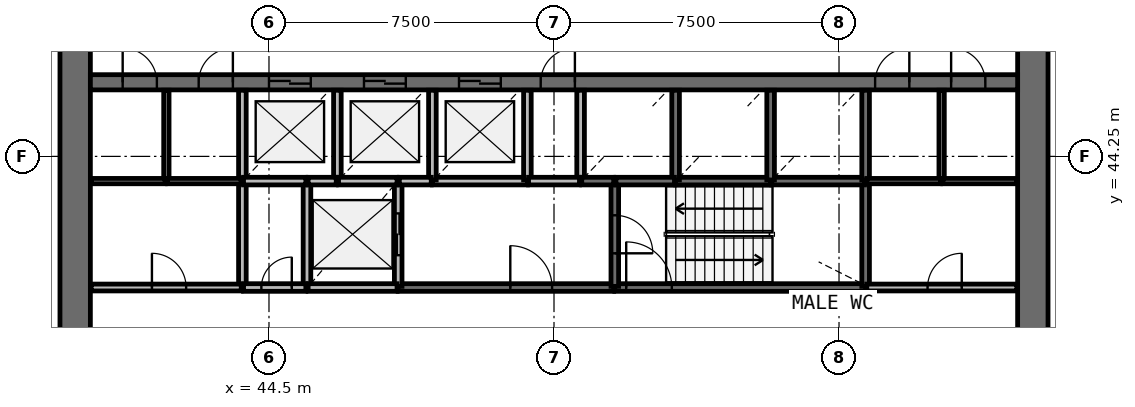
"""IFC4 building model, lengths in metres.
Left out: names, types, materials, properties, quantities, classifications, styles, units other than length and angle.
Written with IfcOpenShell. Run it as: python <this file> out.ifc"""

import sys

from ifc_helpers import new_model, si_unit, direction, frame, frame_2d, origin, place, context, subcontext, project, spatial, rectangle, extrude, source, transform, mapped, element, fill, save


model = new_model("IFC4")
c1 = context("Model", 3, precision=1e-05, world=origin(), true_north=direction((0.0, 1.0)))
c2 = subcontext(c1, "Body", "Model", "MODEL_VIEW")
j1 = project(units=[si_unit("LENGTHUNIT", "METRE"), si_unit("PLANEANGLEUNIT", "RADIAN")], contexts=[c1])
p1 = place(None, origin())
s1 = spatial("IfcSite", under=j1, at=p1, CompositionType="ELEMENT")
p2 = place(p1, origin())
s2 = spatial("IfcBuilding", under=s1, at=p2, CompositionType="ELEMENT")
p3 = place(p2, frame((0.0, 0.0, 96.2)))
s3 = spatial("IfcBuildingStorey", under=s2, at=p3, CompositionType="ELEMENT", Elevation=96.2)
p4 = place(p3, frame((64.6, 38.0, 0.0), z_axis=(0.0, 0.0, 1.0), x_axis=(0.0, 1.0, 0.0)))
e1 = element("IfcWall", 1, at=p4, inside=s3, PredefinedType="SHEAR", context=c2, shape_type="SweptSolid", body=[
    extrude(rectangle(XDim=20.0, YDim=0.8, at=frame_2d((10.0, 0.0))), origin(), (0.0, 0.0, 1.0), 4.1),
])
p5 = place(p4, frame((9.1, 0.0, 0.0)))
e2 = element("IfcOpeningElement", 2, at=p5, cuts=e1, PredefinedType="OPENING", context=c2, shape_type="SweptSolid", body=[
    extrude(rectangle(XDim=1.8, YDim=2.1, at=frame_2d((0.9, 1.05))), frame((0.0, 0.41, 0.0), z_axis=(0.0, -1.0, 0.0), x_axis=(1.0, 0.0, 0.0)), (0.0, 0.0, 1.0), 0.82),
])
p6 = place(p3, frame((39.4, 58.0, 0.0), z_axis=(0.0, 0.0, 1.0), x_axis=(0.0, -1.0, 0.0)))
e3 = element("IfcWall", 3, at=p6, inside=s3, PredefinedType="SHEAR", context=c2, shape_type="SweptSolid", body=[
    extrude(rectangle(XDim=20.0, YDim=0.8, at=frame_2d((10.0, 0.0))), origin(), (0.0, 0.0, 1.0), 4.1),
])
p7 = place(p6, frame((9.1, 0.0, 0.0)))
e4 = element("IfcOpeningElement", 4, at=p7, cuts=e3, PredefinedType="OPENING", context=c2, shape_type="SweptSolid", body=[
    extrude(rectangle(XDim=1.8, YDim=2.1, at=frame_2d((0.9, 1.05))), frame((0.0, 0.41, 0.0), z_axis=(0.0, -1.0, 0.0), x_axis=(1.0, 0.0, 0.0)), (0.0, 0.0, 1.0), 0.82),
])
p8 = place(p3, frame((39.8, 46.2, 0.0), z_axis=(0.0, 0.0, 1.0), x_axis=(1.0, 0.0, 0.0)))
e5 = element("IfcWall", 5, at=p8, inside=s3, PredefinedType="SHEAR", context=c2, shape_type="SweptSolid", body=[
    extrude(rectangle(XDim=24.4, YDim=0.4, at=frame_2d((12.2, 0.0))), origin(), (0.0, 0.0, 1.0), 4.1),
])
p9 = place(p8, frame((4.7, 0.0, 0.0)))
e6 = element("IfcOpeningElement", 6, at=p9, cuts=e5, PredefinedType="OPENING", context=c2, shape_type="SweptSolid", body=[
    extrude(rectangle(XDim=1.1, YDim=2.1, at=frame_2d((0.55, 1.05))), frame((0.0, 0.21, 0.0), z_axis=(0.0, -1.0, 0.0), x_axis=(1.0, 0.0, 0.0)), (0.0, 0.0, 1.0), 0.42),
])
p10 = place(p8, frame((7.2, 0.0, 0.0)))
e7 = element("IfcOpeningElement", 7, at=p10, cuts=e5, PredefinedType="OPENING", context=c2, shape_type="SweptSolid", body=[
    extrude(rectangle(XDim=1.1, YDim=2.1, at=frame_2d((0.55, 1.05))), frame((0.0, 0.21, 0.0), z_axis=(0.0, -1.0, 0.0), x_axis=(1.0, 0.0, 0.0)), (0.0, 0.0, 1.0), 0.42),
])
p11 = place(p8, frame((9.7, 0.0, 0.0)))
e8 = element("IfcOpeningElement", 8, at=p11, cuts=e5, PredefinedType="OPENING", context=c2, shape_type="SweptSolid", body=[
    extrude(rectangle(XDim=1.1, YDim=2.1, at=frame_2d((0.55, 1.05))), frame((0.0, 0.21, 0.0), z_axis=(0.0, -1.0, 0.0), x_axis=(1.0, 0.0, 0.0)), (0.0, 0.0, 1.0), 0.42),
])
p12 = place(p8, frame((20.65, 0.0, 0.0)))
e9 = element("IfcOpeningElement", 9, at=p12, cuts=e5, PredefinedType="OPENING", context=c2, shape_type="SweptSolid", body=[
    extrude(rectangle(XDim=0.9, YDim=2.1, at=frame_2d((0.45, 1.05))), frame((0.0, 0.21, 0.0), z_axis=(0.0, -1.0, 0.0), x_axis=(1.0, 0.0, 0.0)), (0.0, 0.0, 1.0), 0.42),
])
p13 = place(p8, frame((22.65, 0.0, 0.0)))
e10 = element("IfcOpeningElement", 10, at=p13, cuts=e5, PredefinedType="OPENING", context=c2, shape_type="SweptSolid", body=[
    extrude(rectangle(XDim=0.9, YDim=2.1, at=frame_2d((0.45, 1.05))), frame((0.0, 0.21, 0.0), z_axis=(0.0, -1.0, 0.0), x_axis=(1.0, 0.0, 0.0)), (0.0, 0.0, 1.0), 0.42),
])
p14 = place(p8, frame((0.85, 0.0, 0.0)))
e11 = element("IfcOpeningElement", 11, at=p14, cuts=e5, PredefinedType="OPENING", context=c2, shape_type="SweptSolid", body=[
    extrude(rectangle(XDim=0.9, YDim=2.1, at=frame_2d((0.45, 1.05))), frame((0.0, 0.21, 0.0), z_axis=(0.0, -1.0, 0.0), x_axis=(1.0, 0.0, 0.0)), (0.0, 0.0, 1.0), 0.42),
])
p15 = place(p8, frame((2.85, 0.0, 0.0)))
e12 = element("IfcOpeningElement", 12, at=p15, cuts=e5, PredefinedType="OPENING", context=c2, shape_type="SweptSolid", body=[
    extrude(rectangle(XDim=0.9, YDim=2.1, at=frame_2d((0.45, 1.05))), frame((0.0, 0.21, 0.0), z_axis=(0.0, -1.0, 0.0), x_axis=(1.0, 0.0, 0.0)), (0.0, 0.0, 1.0), 0.42),
])
p16 = place(p8, frame((11.85, 0.0, 0.0)))
e13 = element("IfcOpeningElement", 13, at=p16, cuts=e5, PredefinedType="OPENING", context=c2, shape_type="SweptSolid", body=[
    extrude(rectangle(XDim=0.9, YDim=2.1, at=frame_2d((0.45, 1.05))), frame((0.0, 0.21, 0.0), z_axis=(0.0, -1.0, 0.0), x_axis=(1.0, 0.0, 0.0)), (0.0, 0.0, 1.0), 0.42),
])
p17 = place(p3, frame((53.6, 40.8, 0.0), z_axis=(0.0, 0.0, 1.0), x_axis=(1.0, 0.0, 0.0)))
e14 = element("IfcWall", 14, at=p17, inside=s3, PredefinedType="SOLIDWALL", context=c2, shape_type="SweptSolid", body=[
    extrude(rectangle(XDim=6.6, YDim=0.2, at=frame_2d((3.3, 0.0))), origin(), (0.0, 0.0, 1.0), 3.7),
])
p18 = place(p17, frame((0.3, 0.0, 0.0)))
e15 = element("IfcOpeningElement", 15, at=p18, cuts=e14, PredefinedType="OPENING", context=c2, shape_type="SweptSolid", body=[
    extrude(rectangle(XDim=1.2, YDim=2.1, at=frame_2d((0.6, 1.05))), frame((0.0, 0.11, 0.0), z_axis=(0.0, -1.0, 0.0), x_axis=(1.0, 0.0, 0.0)), (0.0, 0.0, 1.0), 0.22),
])
p19 = place(p3, frame((47.9, 40.8, 0.0), z_axis=(0.0, 0.0, 1.0), x_axis=(1.0, 0.0, 0.0)))
e16 = element("IfcWall", 16, at=p19, inside=s3, PredefinedType="SOLIDWALL", context=c2, shape_type="SweptSolid", body=[
    extrude(rectangle(XDim=5.67, YDim=0.2, at=frame_2d((2.835, 0.0))), origin(), (0.0, 0.0, 1.0), 3.7),
])
p20 = place(p19, frame((2.95, 0.0, 0.0)))
e17 = element("IfcOpeningElement", 17, at=p20, cuts=e16, PredefinedType="OPENING", context=c2, shape_type="SweptSolid", body=[
    extrude(rectangle(XDim=1.1, YDim=2.1, at=frame_2d((0.55, 1.05))), frame((0.0, 0.11, 0.0), z_axis=(0.0, -1.0, 0.0), x_axis=(1.0, 0.0, 0.0)), (0.0, 0.0, 1.0), 0.22),
])
for number, where, z_axis, x_axis in (
    (18, (43.8, 43.6, 0.0), (0.0, 0.0, 1.0), (0.0, -1.0, 0.0)),
    (19, (45.5, 43.6, 0.0), (0.0, 0.0, 1.0), (0.0, -1.0, 0.0)),
):
    element("IfcWall", number, at=place(p3, frame(where, z_axis=z_axis, x_axis=x_axis)), inside=s3, PredefinedType="SOLIDWALL", context=c2, shape_type="SweptSolid", body=[
        extrude(rectangle(XDim=2.8, YDim=0.2, at=frame_2d((1.4, 0.0))), origin(), (0.0, 0.0, 1.0), 3.7),
    ])
p21 = place(p3, frame((47.9, 40.83, 0.0), z_axis=(0.0, 0.0, 1.0), x_axis=(0.0, 1.0, 0.0)))
e20 = element("IfcWall", 20, at=p21, inside=s3, PredefinedType="SOLIDWALL", context=c2, shape_type="SweptSolid", body=[
    extrude(rectangle(XDim=2.77, YDim=0.2, at=frame_2d((1.385, 0.0))), origin(), (0.0, 0.0, 1.0), 3.7),
])
p22 = place(p21, frame((0.82, 0.0, 0.0)))
e21 = element("IfcOpeningElement", 21, at=p22, cuts=e20, PredefinedType="OPENING", context=c2, shape_type="SweptSolid", body=[
    extrude(rectangle(XDim=1.1, YDim=2.1, at=frame_2d((0.55, 1.05))), frame((0.0, 0.11, 0.0), z_axis=(0.0, -1.0, 0.0), x_axis=(1.0, 0.0, 0.0)), (0.0, 0.0, 1.0), 0.22),
])
p23 = place(p3, frame((60.2, 40.83, 0.0), z_axis=(0.0, 0.0, 1.0), x_axis=(0.0, 1.0, 0.0)))
e22 = element("IfcWall", 22, at=p23, inside=s3, PredefinedType="SOLIDWALL", context=c2, shape_type="SweptSolid", body=[
    extrude(rectangle(XDim=2.77, YDim=0.2, at=frame_2d((1.385, 0.0))), origin(), (0.0, 0.0, 1.0), 3.7),
])
p24 = place(p3, frame((53.6, 43.6, 0.0), z_axis=(0.0, 0.0, 1.0), x_axis=(0.0, -1.0, 0.0)))
e23 = element("IfcWall", 23, at=p24, inside=s3, PredefinedType="SOLIDWALL", context=c2, shape_type="SweptSolid", body=[
    extrude(rectangle(XDim=2.77, YDim=0.2, at=frame_2d((1.385, 0.0))), origin(), (0.0, 0.0, 1.0), 3.7),
])
p25 = place(p24, frame((0.9, 0.0, 0.0)))
e24 = element("IfcOpeningElement", 24, at=p25, cuts=e23, PredefinedType="OPENING", context=c2, shape_type="SweptSolid", body=[
    extrude(rectangle(XDim=1.0, YDim=2.1, at=frame_2d((0.5, 1.05))), frame((0.0, 0.11, 0.0), z_axis=(0.0, -1.0, 0.0), x_axis=(1.0, 0.0, 0.0)), (0.0, 0.0, 1.0), 0.22),
])
for number, where, z_axis, x_axis in (
    (25, (48.8, 43.6, 0.0), (0.0, 0.0, 1.0), (1.0, 0.0, 0.0)),
    (26, (55.2, 43.6, 0.0), (0.0, 0.0, 1.0), (1.0, 0.0, 0.0)),
):
    element("IfcWall", number, at=place(p3, frame(where, z_axis=z_axis, x_axis=x_axis)), inside=s3, PredefinedType="SOLIDWALL", context=c2, shape_type="SweptSolid", body=[
        extrude(rectangle(XDim=2.5, YDim=0.2, at=frame_2d((1.25, 0.0))), origin(), (0.0, 0.0, 1.0), 3.7),
    ])
p26 = place(p3, frame((57.73, 43.6, 0.0), z_axis=(0.0, 0.0, 1.0), x_axis=(1.0, 0.0, 0.0)))
e27 = element("IfcWall", 27, at=p26, inside=s3, PredefinedType="SOLIDWALL", context=c2, shape_type="SweptSolid", body=[
    extrude(rectangle(XDim=2.44, YDim=0.2, at=frame_2d((1.22, 0.0))), origin(), (0.0, 0.0, 1.0), 3.7),
])
p27 = place(p3, frame((45.53, 40.8, 0.0), z_axis=(0.0, 0.0, 1.0), x_axis=(1.0, 0.0, 0.0)))
e28 = element("IfcWall", 28, at=p27, inside=s3, PredefinedType="SOLIDWALL", context=c2, shape_type="SweptSolid", body=[
    extrude(rectangle(XDim=2.34, YDim=0.2, at=frame_2d((1.17, 0.0))), origin(), (0.0, 0.0, 1.0), 3.7),
])
p28 = place(p3, frame((43.8, 45.99, 0.0), z_axis=(0.0, 0.0, 1.0), x_axis=(0.0, -1.0, 0.0)))
e29 = element("IfcWall", 29, at=p28, inside=s3, PredefinedType="SOLIDWALL", context=c2, shape_type="SweptSolid", body=[
    extrude(rectangle(XDim=2.36, YDim=0.2, at=frame_2d((1.18, 0.0))), origin(), (0.0, 0.0, 1.0), 3.7),
])
p29 = place(p3, frame((46.3, 43.6, 0.0), z_axis=(0.0, 0.0, 1.0), x_axis=(0.0, 1.0, 0.0)))
e30 = element("IfcWall", 30, at=p29, inside=s3, PredefinedType="SOLIDWALL", context=c2, shape_type="SweptSolid", body=[
    extrude(rectangle(XDim=2.39, YDim=0.2, at=frame_2d((1.195, 0.0))), origin(), (0.0, 0.0, 1.0), 3.7),
])
for number, where, z_axis, x_axis in (
    (31, (48.8, 43.63, 0.0), (0.0, 0.0, 1.0), (0.0, 1.0, 0.0)),
    (32, (51.3, 43.63, 0.0), (0.0, 0.0, 1.0), (0.0, 1.0, 0.0)),
):
    element("IfcWall", number, at=place(p3, frame(where, z_axis=z_axis, x_axis=x_axis)), inside=s3, PredefinedType="SOLIDWALL", context=c2, shape_type="SweptSolid", body=[
        extrude(rectangle(XDim=2.36, YDim=0.2, at=frame_2d((1.18, 0.0))), origin(), (0.0, 0.0, 1.0), 3.7),
    ])
p30 = place(p3, frame((52.7, 45.99, 0.0), z_axis=(0.0, 0.0, 1.0), x_axis=(0.0, -1.0, 0.0)))
e33 = element("IfcWall", 33, at=p30, inside=s3, PredefinedType="SOLIDWALL", context=c2, shape_type="SweptSolid", body=[
    extrude(rectangle(XDim=2.39, YDim=0.2, at=frame_2d((1.195, 0.0))), origin(), (0.0, 0.0, 1.0), 3.7),
])
for number, where, z_axis, x_axis in (
    (34, (55.2, 43.63, 0.0), (0.0, 0.0, 1.0), (0.0, 1.0, 0.0)),
    (35, (57.7, 43.63, 0.0), (0.0, 0.0, 1.0), (0.0, 1.0, 0.0)),
    (36, (60.2, 43.63, 0.0), (0.0, 0.0, 1.0), (0.0, 1.0, 0.0)),
):
    element("IfcWall", number, at=place(p3, frame(where, z_axis=z_axis, x_axis=x_axis)), inside=s3, PredefinedType="SOLIDWALL", context=c2, shape_type="SweptSolid", body=[
        extrude(rectangle(XDim=2.36, YDim=0.2, at=frame_2d((1.18, 0.0))), origin(), (0.0, 0.0, 1.0), 3.7),
    ])
p31 = place(p3, frame((43.83, 43.6, 0.0), z_axis=(0.0, 0.0, 1.0), x_axis=(1.0, 0.0, 0.0)))
e37 = element("IfcWall", 37, at=p31, inside=s3, PredefinedType="SOLIDWALL", context=c2, shape_type="SweptSolid", body=[
    extrude(rectangle(XDim=1.64, YDim=0.2, at=frame_2d((0.82, 0.0))), origin(), (0.0, 0.0, 1.0), 3.7),
])
p32 = place(p3, frame((43.83, 40.8, 0.0), z_axis=(0.0, 0.0, 1.0), x_axis=(1.0, 0.0, 0.0)))
e38 = element("IfcWall", 38, at=p32, inside=s3, PredefinedType="SOLIDWALL", context=c2, shape_type="SweptSolid", body=[
    extrude(rectangle(XDim=1.64, YDim=0.2, at=frame_2d((0.82, 0.0))), origin(), (0.0, 0.0, 1.0), 3.7),
])
p33 = place(p32, frame((0.47, 0.0, 0.0)))
e39 = element("IfcOpeningElement", 39, at=p33, cuts=e38, PredefinedType="OPENING", context=c2, shape_type="SweptSolid", body=[
    extrude(rectangle(XDim=0.8, YDim=2.1, at=frame_2d((0.4, 1.05))), frame((0.0, 0.11, 0.0), z_axis=(0.0, -1.0, 0.0), x_axis=(1.0, 0.0, 0.0)), (0.0, 0.0, 1.0), 0.22),
])
for number, where, z_axis, x_axis in (
    (40, (46.33, 43.6, 0.0), (0.0, 0.0, 1.0), (1.0, 0.0, 0.0)),
    (41, (53.63, 43.6, 0.0), (0.0, 0.0, 1.0), (1.0, 0.0, 0.0)),
):
    element("IfcWall", number, at=place(p3, frame(where, z_axis=z_axis, x_axis=x_axis)), inside=s3, PredefinedType="SOLIDWALL", context=c2, shape_type="SweptSolid", body=[
        extrude(rectangle(XDim=1.54, YDim=0.2, at=frame_2d((0.77, 0.0))), origin(), (0.0, 0.0, 1.0), 3.7),
    ])
p34 = place(p3, frame((52.67, 43.6, 0.0), z_axis=(0.0, 0.0, 1.0), x_axis=(-1.0, 0.0, 0.0)))
e42 = element("IfcWall", 42, at=p34, inside=s3, PredefinedType="SOLIDWALL", context=c2, shape_type="SweptSolid", body=[
    extrude(rectangle(XDim=1.34, YDim=0.2, at=frame_2d((0.67, 0.0))), origin(), (0.0, 0.0, 1.0), 3.7),
])
for number, where, z_axis, x_axis in (
    (43, (47.93, 43.6, 0.0), (0.0, 0.0, 1.0), (1.0, 0.0, 0.0)),
    (44, (52.73, 43.6, 0.0), (0.0, 0.0, 1.0), (1.0, 0.0, 0.0)),
):
    element("IfcWall", number, at=place(p3, frame(where, z_axis=z_axis, x_axis=x_axis)), inside=s3, PredefinedType="SOLIDWALL", context=c2, shape_type="SweptSolid", body=[
        extrude(rectangle(XDim=0.84, YDim=0.2, at=frame_2d((0.42, 0.0))), origin(), (0.0, 0.0, 1.0), 3.7),
    ])
p35 = place(p3, frame((45.53, 43.6, 0.0), z_axis=(0.0, 0.0, 1.0), x_axis=(1.0, 0.0, 0.0)))
e45 = element("IfcWall", 45, at=p35, inside=s3, PredefinedType="SOLIDWALL", context=c2, shape_type="SweptSolid", body=[
    extrude(rectangle(XDim=0.74, YDim=0.2, at=frame_2d((0.37, 0.0))), origin(), (0.0, 0.0, 1.0), 3.7),
])
p36 = place(p3, frame((60.23, 40.8, 0.0), z_axis=(0.0, 0.0, 1.0), x_axis=(1.0, 0.0, 0.0)))
e46 = element("IfcWall", 46, at=p36, inside=s3, PredefinedType="PARTITIONING", context=c2, shape_type="SweptSolid", body=[
    extrude(rectangle(XDim=3.95, YDim=0.18, at=frame_2d((1.975, 0.0))), origin(), (0.0, 0.0, 1.0), 3.7),
])
p37 = place(p36, frame((1.6, 0.0, 0.0)))
e47 = element("IfcOpeningElement", 47, at=p37, cuts=e46, PredefinedType="OPENING", context=c2, shape_type="SweptSolid", body=[
    extrude(rectangle(XDim=0.9, YDim=2.1, at=frame_2d((0.45, 1.05))), frame((0.0, 0.1, 0.0), z_axis=(0.0, -1.0, 0.0), x_axis=(1.0, 0.0, 0.0)), (0.0, 0.0, 1.0), 0.2),
])
p38 = place(p3, frame((39.82, 40.8, 0.0), z_axis=(0.0, 0.0, 1.0), x_axis=(1.0, 0.0, 0.0)))
e48 = element("IfcWall", 48, at=p38, inside=s3, PredefinedType="PARTITIONING", context=c2, shape_type="SweptSolid", body=[
    extrude(rectangle(XDim=3.95, YDim=0.18, at=frame_2d((1.975, 0.0))), origin(), (0.0, 0.0, 1.0), 3.7),
])
p39 = place(p38, frame((1.6, 0.0, 0.0)))
e49 = element("IfcOpeningElement", 49, at=p39, cuts=e48, PredefinedType="OPENING", context=c2, shape_type="SweptSolid", body=[
    extrude(rectangle(XDim=0.9, YDim=2.1, at=frame_2d((0.45, 1.05))), frame((0.0, 0.1, 0.0), z_axis=(0.0, -1.0, 0.0), x_axis=(1.0, 0.0, 0.0)), (0.0, 0.0, 1.0), 0.2),
])
for number, where, z_axis, x_axis in (
    (50, (41.8, 43.6, 0.0), (0.0, 0.0, 1.0), (0.0, 1.0, 0.0)),
    (51, (62.2, 43.6, 0.0), (0.0, 0.0, 1.0), (0.0, 1.0, 0.0)),
):
    element("IfcWall", number, at=place(p3, frame(where, z_axis=z_axis, x_axis=x_axis)), inside=s3, PredefinedType="PARTITIONING", context=c2, shape_type="SweptSolid", body=[
        extrude(rectangle(XDim=2.39, YDim=0.14, at=frame_2d((1.195, 0.0))), origin(), (0.0, 0.0, 1.0), 2.9),
    ])
for number, where, z_axis, x_axis in (
    (52, (43.77, 43.6, 0.0), (0.0, 0.0, 1.0), (-1.0, 0.0, 0.0)),
    (53, (60.23, 43.6, 0.0), (0.0, 0.0, 1.0), (1.0, 0.0, 0.0)),
):
    element("IfcWall", number, at=place(p3, frame(where, z_axis=z_axis, x_axis=x_axis)), inside=s3, PredefinedType="PARTITIONING", context=c2, shape_type="SweptSolid", body=[
        extrude(rectangle(XDim=1.94, YDim=0.14, at=frame_2d((0.97, 0.0))), origin(), (0.0, 0.0, 1.0), 2.9),
    ])
for number, where, z_axis, x_axis in (
    (54, (62.23, 43.6, 0.0), (0.0, 0.0, 1.0), (1.0, 0.0, 0.0)),
    (55, (41.77, 43.6, 0.0), (0.0, 0.0, 1.0), (-1.0, 0.0, 0.0)),
):
    element("IfcWall", number, at=place(p3, frame(where, z_axis=z_axis, x_axis=x_axis)), inside=s3, PredefinedType="PARTITIONING", context=c2, shape_type="SweptSolid", body=[
        extrude(rectangle(XDim=1.95, YDim=0.14, at=frame_2d((0.975, 0.0))), origin(), (0.0, 0.0, 1.0), 2.9),
    ])
m1 = source(origin(), c2, "Body", "SweptSolid", [
    extrude(rectangle(XDim=1.1, YDim=2.1, at=frame_2d((0.55, 1.05))), frame((0.0, 0.025, 0.0), z_axis=(0.0, -1.0, 0.0), x_axis=(1.0, 0.0, 0.0)), (0.0, 0.0, 1.0), 0.05),
])
p40 = place(p9, origin())
e56 = element("IfcDoor", 56, at=p40, inside=s3, OperationType="DOUBLE_DOOR_SLIDING", PredefinedType="USERDEFINED", context=c2, shape_type="MappedRepresentation", body=[
    mapped(m1, transform((0.0, 0.0, 0.0), scale=1.0)),
])
fill(e6, e56)
p41 = place(p10, origin())
e57 = element("IfcDoor", 57, at=p41, inside=s3, OperationType="DOUBLE_DOOR_SLIDING", PredefinedType="USERDEFINED", context=c2, shape_type="MappedRepresentation", body=[
    mapped(m1, transform((0.0, 0.0, 0.0), scale=1.0)),
])
fill(e7, e57)
p42 = place(p11, origin())
e58 = element("IfcDoor", 58, at=p42, inside=s3, OperationType="DOUBLE_DOOR_SLIDING", PredefinedType="USERDEFINED", context=c2, shape_type="MappedRepresentation", body=[
    mapped(m1, transform((0.0, 0.0, 0.0), scale=1.0)),
])
fill(e8, e58)
p43 = place(p22, origin())
e59 = element("IfcDoor", 59, at=p43, inside=s3, OperationType="DOUBLE_DOOR_SLIDING", PredefinedType="USERDEFINED", context=c2, shape_type="MappedRepresentation", body=[
    mapped(m1, transform((0.0, 0.0, 0.0), scale=1.0)),
])
fill(e21, e59)
m2 = source(origin(), c2, "Body", "SweptSolid", [
    extrude(rectangle(XDim=1.2, YDim=2.1, at=frame_2d((0.6, 1.05))), frame((0.0, 0.025, 0.0), z_axis=(0.0, -1.0, 0.0), x_axis=(1.0, 0.0, 0.0)), (0.0, 0.0, 1.0), 0.05),
])
p44 = place(p18, origin())
e60 = element("IfcDoor", 60, at=p44, inside=s3, OperationType="SINGLE_SWING_LEFT", PredefinedType="DOOR", context=c2, shape_type="MappedRepresentation", body=[
    mapped(m2, transform((0.0, 0.0, 0.0), scale=1.0)),
])
fill(e15, e60)
m3 = source(origin(), c2, "Body", "SweptSolid", [
    extrude(rectangle(XDim=1.0, YDim=2.1, at=frame_2d((0.5, 1.05))), frame((0.0, 0.025, 0.0), z_axis=(0.0, -1.0, 0.0), x_axis=(1.0, 0.0, 0.0)), (0.0, 0.0, 1.0), 0.05),
])
p45 = place(p25, origin())
e61 = element("IfcDoor", 61, at=p45, inside=s3, OperationType="SINGLE_SWING_RIGHT", PredefinedType="DOOR", context=c2, shape_type="MappedRepresentation", body=[
    mapped(m3, transform((0.0, 0.0, 0.0), scale=1.0)),
])
fill(e24, e61)
m4 = source(origin(), c2, "Body", "SweptSolid", [
    extrude(rectangle(XDim=1.1, YDim=2.1, at=frame_2d((0.55, 1.05))), frame((0.0, 0.025, 0.0), z_axis=(0.0, -1.0, 0.0), x_axis=(1.0, 0.0, 0.0)), (0.0, 0.0, 1.0), 0.05),
])
p46 = place(p20, origin())
e62 = element("IfcDoor", 62, at=p46, inside=s3, OperationType="SINGLE_SWING_LEFT", PredefinedType="DOOR", context=c2, shape_type="MappedRepresentation", body=[
    mapped(m4, transform((0.0, 0.0, 0.0), scale=1.0)),
])
fill(e17, e62)
m5 = source(origin(), c2, "Body", "SweptSolid", [
    extrude(rectangle(XDim=0.8, YDim=2.1, at=frame_2d((0.4, 1.05))), frame((0.0, 0.025, 0.0), z_axis=(0.0, -1.0, 0.0), x_axis=(1.0, 0.0, 0.0)), (0.0, 0.0, 1.0), 0.05),
])
p47 = place(p33, origin())
e63 = element("IfcDoor", 63, at=p47, inside=s3, OperationType="SINGLE_SWING_RIGHT", PredefinedType="DOOR", context=c2, shape_type="MappedRepresentation", body=[
    mapped(m5, transform((0.0, 0.0, 0.0), scale=1.0)),
])
fill(e39, e63)
m6 = source(origin(), c2, "Body", "SweptSolid", [
    extrude(rectangle(XDim=0.9, YDim=2.1, at=frame_2d((0.45, 1.05))), frame((0.0, 0.025, 0.0), z_axis=(0.0, -1.0, 0.0), x_axis=(1.0, 0.0, 0.0)), (0.0, 0.0, 1.0), 0.05),
])
p48 = place(p39, origin())
e64 = element("IfcDoor", 64, at=p48, inside=s3, OperationType="SINGLE_SWING_LEFT", PredefinedType="DOOR", context=c2, shape_type="MappedRepresentation", body=[
    mapped(m6, transform((0.0, 0.0, 0.0), scale=1.0)),
])
fill(e49, e64)
p49 = place(p12, origin())
e65 = element("IfcDoor", 65, at=p49, inside=s3, OperationType="SINGLE_SWING_RIGHT", PredefinedType="DOOR", context=c2, shape_type="MappedRepresentation", body=[
    mapped(m6, transform((0.0, 0.0, 0.0), scale=1.0)),
])
fill(e9, e65)
p50 = place(p13, origin())
e66 = element("IfcDoor", 66, at=p50, inside=s3, OperationType="SINGLE_SWING_LEFT", PredefinedType="DOOR", context=c2, shape_type="MappedRepresentation", body=[
    mapped(m6, transform((0.0, 0.0, 0.0), scale=1.0)),
])
fill(e10, e66)
p51 = place(p37, origin())
e67 = element("IfcDoor", 67, at=p51, inside=s3, OperationType="SINGLE_SWING_RIGHT", PredefinedType="DOOR", context=c2, shape_type="MappedRepresentation", body=[
    mapped(m6, transform((0.0, 0.0, 0.0), scale=1.0)),
])
fill(e47, e67)
p52 = place(p14, origin())
e68 = element("IfcDoor", 68, at=p52, inside=s3, OperationType="SINGLE_SWING_LEFT", PredefinedType="DOOR", context=c2, shape_type="MappedRepresentation", body=[
    mapped(m6, transform((0.0, 0.0, 0.0), scale=1.0)),
])
fill(e11, e68)
p53 = place(p15, origin())
e69 = element("IfcDoor", 69, at=p53, inside=s3, OperationType="SINGLE_SWING_RIGHT", PredefinedType="DOOR", context=c2, shape_type="MappedRepresentation", body=[
    mapped(m6, transform((0.0, 0.0, 0.0), scale=1.0)),
])
fill(e12, e69)
p54 = place(p16, origin())
e70 = element("IfcDoor", 70, at=p54, inside=s3, OperationType="SINGLE_SWING_RIGHT", PredefinedType="DOOR", context=c2, shape_type="MappedRepresentation", body=[
    mapped(m6, transform((0.0, 0.0, 0.0), scale=1.0)),
])
fill(e13, e70)
save(model, sys.argv[1])
